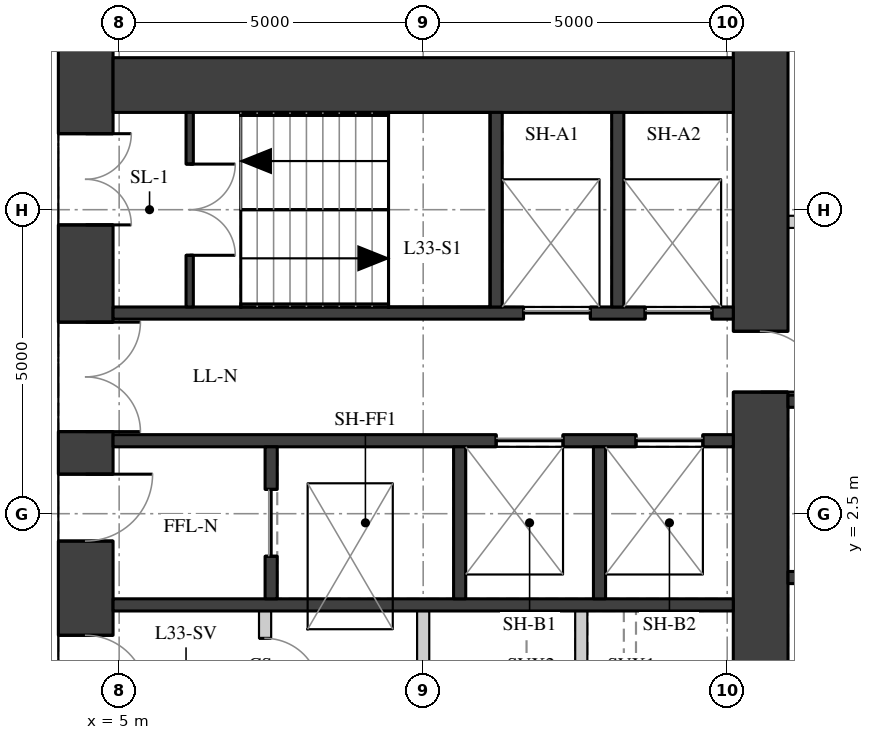
"""IFC4 building model, lengths in metres.
Left out: names, types, materials, properties, quantities, classifications, styles, units other than length and angle.
Written with IfcOpenShell. Run it as: python <this file> out.ifc"""

import sys

from ifc_helpers import new_model, si_unit, direction, frame, frame_2d, origin, place, context, subcontext, project, spatial, rectangle, extrude, element, fill, save


model = new_model("IFC4")
c1 = context("Model", 3, precision=1e-05, world=origin(), true_north=direction((0.0, 1.0)))
c2 = subcontext(c1, "Body", "Model", "MODEL_VIEW")
j1 = project(units=[si_unit("LENGTHUNIT", "METRE"), si_unit("PLANEANGLEUNIT", "RADIAN")], contexts=[c1])
p1 = place(None, origin())
s1 = spatial("IfcSite", under=j1, at=p1, CompositionType="ELEMENT")
p2 = place(p1, origin())
s2 = spatial("IfcBuilding", under=s1, at=p2, CompositionType="ELEMENT")
p3 = place(p2, frame((0.0, 0.0, 118.6)))
s3 = spatial("IfcBuildingStorey", under=s2, at=p3, CompositionType="ELEMENT", Elevation=118.6)
p4 = place(p3, frame((4.45, -11.1, 0.0), z_axis=(0.0, 0.0, 1.0), x_axis=(0.0, 1.0, 0.0)))
e1 = element("IfcWall", 1, at=p4, inside=s3, PredefinedType="SHEAR", context=c2, shape_type="SweptSolid", body=[
    extrude(rectangle(XDim=22.2, YDim=0.9, at=frame_2d((11.1, 0.0))), origin(), (0.0, 0.0, 1.0), 3.02),
])
p5 = place(p4, frame((2.35, 0.0, 0.0)))
e2 = element("IfcOpeningElement", 2, at=p5, cuts=e1, PredefinedType="OPENING", context=c2, shape_type="SweptSolid", body=[
    extrude(rectangle(XDim=1.5, YDim=2.1, at=frame_2d((0.75, 1.05))), frame((0.0, 0.46, 0.0), z_axis=(0.0, -1.0, 0.0), x_axis=(1.0, 0.0, 0.0)), (0.0, 0.0, 1.0), 0.92),
])
p6 = place(p4, frame((5.45, 0.0, 0.0)))
e3 = element("IfcOpeningElement", 3, at=p6, cuts=e1, PredefinedType="OPENING", context=c2, shape_type="SweptSolid", body=[
    extrude(rectangle(XDim=1.8, YDim=2.1, at=frame_2d((0.9, 1.05))), frame((0.0, 0.46, 0.0), z_axis=(0.0, -1.0, 0.0), x_axis=(1.0, 0.0, 0.0)), (0.0, 0.0, 1.0), 0.92),
])
p7 = place(p4, frame((7.95, 0.0, 0.0)))
e4 = element("IfcOpeningElement", 4, at=p7, cuts=e1, PredefinedType="OPENING", context=c2, shape_type="SweptSolid", body=[
    extrude(rectangle(XDim=1.1, YDim=2.1, at=frame_2d((0.55, 1.05))), frame((0.0, 0.46, 0.0), z_axis=(0.0, -1.0, 0.0), x_axis=(1.0, 0.0, 0.0)), (0.0, 0.0, 1.0), 0.92),
])
p8 = place(p4, frame((10.6, 0.0, 0.0)))
e5 = element("IfcOpeningElement", 5, at=p8, cuts=e1, PredefinedType="OPENING", context=c2, shape_type="SweptSolid", body=[
    extrude(rectangle(XDim=1.0, YDim=2.1, at=frame_2d((0.5, 1.05))), frame((0.0, 0.46, 0.0), z_axis=(0.0, -1.0, 0.0), x_axis=(1.0, 0.0, 0.0)), (0.0, 0.0, 1.0), 0.92),
])
p9 = place(p4, frame((13.15, 0.0, 0.0)))
e6 = element("IfcOpeningElement", 6, at=p9, cuts=e1, PredefinedType="OPENING", context=c2, shape_type="SweptSolid", body=[
    extrude(rectangle(XDim=1.1, YDim=2.1, at=frame_2d((0.55, 1.05))), frame((0.0, 0.46, 0.0), z_axis=(0.0, -1.0, 0.0), x_axis=(1.0, 0.0, 0.0)), (0.0, 0.0, 1.0), 0.92),
])
p10 = place(p4, frame((14.95, 0.0, 0.0)))
e7 = element("IfcOpeningElement", 7, at=p10, cuts=e1, PredefinedType="OPENING", context=c2, shape_type="SweptSolid", body=[
    extrude(rectangle(XDim=1.8, YDim=2.1, at=frame_2d((0.9, 1.05))), frame((0.0, 0.46, 0.0), z_axis=(0.0, -1.0, 0.0), x_axis=(1.0, 0.0, 0.0)), (0.0, 0.0, 1.0), 0.92),
])
p11 = place(p4, frame((18.35, 0.0, 0.0)))
e8 = element("IfcOpeningElement", 8, at=p11, cuts=e1, PredefinedType="OPENING", context=c2, shape_type="SweptSolid", body=[
    extrude(rectangle(XDim=1.5, YDim=2.1, at=frame_2d((0.75, 1.05))), frame((0.0, 0.46, 0.0), z_axis=(0.0, -1.0, 0.0), x_axis=(1.0, 0.0, 0.0)), (0.0, 0.0, 1.0), 0.92),
])
p12 = place(p3, frame((15.55, -11.1, 0.0), z_axis=(0.0, 0.0, 1.0), x_axis=(0.0, 1.0, 0.0)))
e9 = element("IfcWall", 9, at=p12, inside=s3, PredefinedType="SHEAR", context=c2, shape_type="SweptSolid", body=[
    extrude(rectangle(XDim=22.2, YDim=0.9, at=frame_2d((11.1, 0.0))), origin(), (0.0, 0.0, 1.0), 3.02),
])
p13 = place(p12, frame((15.6, 0.0, 0.0)))
e10 = element("IfcOpeningElement", 10, at=p13, cuts=e9, PredefinedType="OPENING", context=c2, shape_type="SweptSolid", body=[
    extrude(rectangle(XDim=1.0, YDim=2.1, at=frame_2d((0.5, 1.05))), frame((0.0, 0.46, 0.0), z_axis=(0.0, -1.0, 0.0), x_axis=(1.0, 0.0, 0.0)), (0.0, 0.0, 1.0), 0.92),
])
p14 = place(p12, frame((5.6, 0.0, 0.0)))
e11 = element("IfcOpeningElement", 11, at=p14, cuts=e9, PredefinedType="OPENING", context=c2, shape_type="SweptSolid", body=[
    extrude(rectangle(XDim=1.0, YDim=2.1, at=frame_2d((0.5, 1.05))), frame((0.0, 0.46, 0.0), z_axis=(0.0, -1.0, 0.0), x_axis=(1.0, 0.0, 0.0)), (0.0, 0.0, 1.0), 0.92),
])
p15 = place(p3, frame((4.9, 9.55, 0.0), z_axis=(0.0, 0.0, 1.0), x_axis=(1.0, 0.0, 0.0)))
e12 = element("IfcWall", 12, at=p15, inside=s3, PredefinedType="SHEAR", context=c2, shape_type="SweptSolid", body=[
    extrude(rectangle(XDim=10.2, YDim=0.9, at=frame_2d((5.1, 0.0))), origin(), (0.0, 0.0, 1.0), 3.02),
])
p16 = place(p3, frame((4.9, 5.8, 0.0), z_axis=(0.0, 0.0, 1.0), x_axis=(1.0, 0.0, 0.0)))
e13 = element("IfcWall", 13, at=p16, inside=s3, PredefinedType="SHEAR", context=c2, shape_type="SweptSolid", body=[
    extrude(rectangle(XDim=10.2, YDim=0.2, at=frame_2d((5.1, 0.0))), origin(), (0.0, 0.0, 1.0), 3.02),
])
p17 = place(p16, frame((6.75, 0.0, 0.0)))
e14 = element("IfcOpeningElement", 14, at=p17, cuts=e13, PredefinedType="OPENING", context=c2, shape_type="SweptSolid", body=[
    extrude(rectangle(XDim=1.1, YDim=2.1, at=frame_2d((0.55, 1.05))), frame((0.0, 0.11, 0.0), z_axis=(0.0, -1.0, 0.0), x_axis=(1.0, 0.0, 0.0)), (0.0, 0.0, 1.0), 0.22),
])
p18 = place(p16, frame((8.75, 0.0, 0.0)))
e15 = element("IfcOpeningElement", 15, at=p18, cuts=e13, PredefinedType="OPENING", context=c2, shape_type="SweptSolid", body=[
    extrude(rectangle(XDim=1.1, YDim=2.1, at=frame_2d((0.55, 1.05))), frame((0.0, 0.11, 0.0), z_axis=(0.0, -1.0, 0.0), x_axis=(1.0, 0.0, 0.0)), (0.0, 0.0, 1.0), 0.22),
])
p19 = place(p3, frame((4.9, 3.7, 0.0), z_axis=(0.0, 0.0, 1.0), x_axis=(1.0, 0.0, 0.0)))
e16 = element("IfcWall", 16, at=p19, inside=s3, PredefinedType="SHEAR", context=c2, shape_type="SweptSolid", body=[
    extrude(rectangle(XDim=10.2, YDim=0.2, at=frame_2d((5.1, 0.0))), origin(), (0.0, 0.0, 1.0), 3.02),
])
p20 = place(p19, frame((6.3, 0.0, 0.0)))
e17 = element("IfcOpeningElement", 17, at=p20, cuts=e16, PredefinedType="OPENING", context=c2, shape_type="SweptSolid", body=[
    extrude(rectangle(XDim=1.1, YDim=2.1, at=frame_2d((0.55, 1.05))), frame((0.0, 0.11, 0.0), z_axis=(0.0, -1.0, 0.0), x_axis=(1.0, 0.0, 0.0)), (0.0, 0.0, 1.0), 0.22),
])
p21 = place(p19, frame((8.6, 0.0, 0.0)))
e18 = element("IfcOpeningElement", 18, at=p21, cuts=e16, PredefinedType="OPENING", context=c2, shape_type="SweptSolid", body=[
    extrude(rectangle(XDim=1.1, YDim=2.1, at=frame_2d((0.55, 1.05))), frame((0.0, 0.11, 0.0), z_axis=(0.0, -1.0, 0.0), x_axis=(1.0, 0.0, 0.0)), (0.0, 0.0, 1.0), 0.22),
])
p22 = place(p3, frame((4.9, 1.0, 0.0), z_axis=(0.0, 0.0, 1.0), x_axis=(1.0, 0.0, 0.0)))
e19 = element("IfcWall", 19, at=p22, inside=s3, PredefinedType="SHEAR", context=c2, shape_type="SweptSolid", body=[
    extrude(rectangle(XDim=10.2, YDim=0.2, at=frame_2d((5.1, 0.0))), origin(), (0.0, 0.0, 1.0), 3.02),
])
for number, where, z_axis, x_axis in (
    (20, (11.2, 5.9, 0.0), (0.0, 0.0, 1.0), (0.0, 1.0, 0.0)),
    (21, (13.2, 5.9, 0.0), (0.0, 0.0, 1.0), (0.0, 1.0, 0.0)),
):
    element("IfcWall", number, at=place(p3, frame(where, z_axis=z_axis, x_axis=x_axis)), inside=s3, PredefinedType="SHEAR", context=c2, shape_type="SweptSolid", body=[
        extrude(rectangle(XDim=3.2, YDim=0.2, at=frame_2d((1.6, 0.0))), origin(), (0.0, 0.0, 1.0), 3.02),
    ])
p23 = place(p3, frame((7.5, 1.1, 0.0), z_axis=(0.0, 0.0, 1.0), x_axis=(0.0, 1.0, 0.0)))
e22 = element("IfcWall", 22, at=p23, inside=s3, PredefinedType="SHEAR", context=c2, shape_type="SweptSolid", body=[
    extrude(rectangle(XDim=2.5, YDim=0.2, at=frame_2d((1.25, 0.0))), origin(), (0.0, 0.0, 1.0), 3.02),
])
p24 = place(p23, frame((0.7, 0.0, 0.0)))
e23 = element("IfcOpeningElement", 23, at=p24, cuts=e22, PredefinedType="OPENING", context=c2, shape_type="SweptSolid", body=[
    extrude(rectangle(XDim=1.1, YDim=2.1, at=frame_2d((0.55, 1.05))), frame((0.0, 0.11, 0.0), z_axis=(0.0, -1.0, 0.0), x_axis=(1.0, 0.0, 0.0)), (0.0, 0.0, 1.0), 0.22),
])
for number, where, z_axis, x_axis in (
    (24, (10.6, 1.1, 0.0), (0.0, 0.0, 1.0), (0.0, 1.0, 0.0)),
    (25, (12.9, 1.1, 0.0), (0.0, 0.0, 1.0), (0.0, 1.0, 0.0)),
):
    element("IfcWall", number, at=place(p3, frame(where, z_axis=z_axis, x_axis=x_axis)), inside=s3, PredefinedType="SHEAR", context=c2, shape_type="SweptSolid", body=[
        extrude(rectangle(XDim=2.5, YDim=0.2, at=frame_2d((1.25, 0.0))), origin(), (0.0, 0.0, 1.0), 3.02),
    ])
p25 = place(p3, frame((6.16, 5.9, 0.0), z_axis=(0.0, 0.0, 1.0), x_axis=(0.0, 1.0, 0.0)))
e26 = element("IfcWall", 26, at=p25, inside=s3, PredefinedType="SHEAR", context=c2, shape_type="SweptSolid", body=[
    extrude(rectangle(XDim=3.2, YDim=0.12, at=frame_2d((1.6, 0.0))), origin(), (0.0, 0.0, 1.0), 3.02),
])
p26 = place(p25, frame((0.85, 0.0, 0.0)))
e27 = element("IfcOpeningElement", 27, at=p26, cuts=e26, PredefinedType="OPENING", context=c2, shape_type="SweptSolid", body=[
    extrude(rectangle(XDim=1.5, YDim=2.1, at=frame_2d((0.75, 1.05))), frame((0.0, 0.07, 0.0), z_axis=(0.0, -1.0, 0.0), x_axis=(1.0, 0.0, 0.0)), (0.0, 0.0, 1.0), 0.14),
])
p27 = place(p3, frame((7.4, -0.9, 0.0), z_axis=(0.0, 0.0, 1.0), x_axis=(0.0, 1.0, 0.0)))
e28 = element("IfcWall", 28, at=p27, inside=s3, PredefinedType="PARTITIONING", context=c2, shape_type="SweptSolid", body=[
    extrude(rectangle(XDim=1.8, YDim=0.2, at=frame_2d((0.9, 0.0))), origin(), (0.0, 0.0, 1.0), 3.02),
])
p28 = place(p27, frame((0.45, 0.0, 0.0)))
e29 = element("IfcOpeningElement", 29, at=p28, cuts=e28, PredefinedType="OPENING", context=c2, shape_type="SweptSolid", body=[
    extrude(rectangle(XDim=0.9, YDim=2.1, at=frame_2d((0.45, 1.05))), frame((0.0, 0.11, 0.0), z_axis=(0.0, -1.0, 0.0), x_axis=(1.0, 0.0, 0.0)), (0.0, 0.0, 1.0), 0.22),
])
for number, where, z_axis, x_axis in (
    (30, (10.0, -0.9, 0.0), (0.0, 0.0, 1.0), (0.0, 1.0, 0.0)),
    (31, (12.6, -0.9, 0.0), (0.0, 0.0, 1.0), (0.0, 1.0, 0.0)),
):
    element("IfcWall", number, at=place(p3, frame(where, z_axis=z_axis, x_axis=x_axis)), inside=s3, PredefinedType="PARTITIONING", context=c2, shape_type="SweptSolid", body=[
        extrude(rectangle(XDim=1.8, YDim=0.2, at=frame_2d((0.9, 0.0))), origin(), (0.0, 0.0, 1.0), 3.02),
    ])
for number, where, z_axis, x_axis in (
    (32, (16.0, 1.45, 0.0), (0.0, 0.0, 1.0), (1.0, 0.0, 0.0)),
    (33, (16.0, 4.35, 0.0), (0.0, 0.0, 1.0), (1.0, 0.0, 0.0)),
):
    element("IfcWall", number, at=place(p3, frame(where, z_axis=z_axis, x_axis=x_axis)), inside=s3, PredefinedType="SHEAR", context=c2, shape_type="SweptSolid", body=[
        extrude(rectangle(XDim=2.3, YDim=0.2, at=frame_2d((1.15, 0.0))), origin(), (0.0, 0.0, 1.0), 3.02),
    ])
p29 = place(p3, frame((16.0, 7.3, 0.0), z_axis=(0.0, 0.0, 1.0), x_axis=(1.0, 0.0, 0.0)))
e34 = element("IfcWall", 34, at=p29, inside=s3, PredefinedType="PARTITIONING", context=c2, shape_type="SweptSolid", body=[
    extrude(rectangle(XDim=2.3, YDim=0.2, at=frame_2d((1.15, 0.0))), origin(), (0.0, 0.0, 1.0), 3.02),
])
p30 = place(p29, frame((0.2, 0.0, 0.0)))
e35 = element("IfcOpeningElement", 35, at=p30, cuts=e34, PredefinedType="OPENING", context=c2, shape_type="SweptSolid", body=[
    extrude(rectangle(XDim=0.9, YDim=2.1, at=frame_2d((0.45, 1.05))), frame((0.0, 0.11, 0.0), z_axis=(0.0, -1.0, 0.0), x_axis=(1.0, 0.0, 0.0)), (0.0, 0.0, 1.0), 0.22),
])
p31 = place(p8, origin())
e36 = element("IfcDoor", 36, at=p31, inside=s3, OperationType="SINGLE_SWING_RIGHT", PredefinedType="DOOR", context=c2, shape_type="SweptSolid", body=[
    extrude(rectangle(XDim=1.0, YDim=2.1, at=frame_2d((0.5, 1.05))), frame((0.0, 0.025, 0.0), z_axis=(0.0, -1.0, 0.0), x_axis=(1.0, 0.0, 0.0)), (0.0, 0.0, 1.0), 0.05),
])
fill(e5, e36)
p32 = place(p9, origin())
e37 = element("IfcDoor", 37, at=p32, inside=s3, OperationType="SINGLE_SWING_LEFT", PredefinedType="DOOR", context=c2, shape_type="SweptSolid", body=[
    extrude(rectangle(XDim=1.1, YDim=2.1, at=frame_2d((0.55, 1.05))), frame((0.0, 0.025, 0.0), z_axis=(0.0, -1.0, 0.0), x_axis=(1.0, 0.0, 0.0)), (0.0, 0.0, 1.0), 0.05),
])
fill(e6, e37)
p33 = place(p10, origin())
e38 = element("IfcDoor", 38, at=p33, inside=s3, OperationType="DOUBLE_DOOR_SINGLE_SWING", PredefinedType="DOOR", context=c2, shape_type="SweptSolid", body=[
    extrude(rectangle(XDim=1.8, YDim=2.1, at=frame_2d((0.9, 1.05))), frame((0.0, 0.025, 0.0), z_axis=(0.0, -1.0, 0.0), x_axis=(1.0, 0.0, 0.0)), (0.0, 0.0, 1.0), 0.05),
])
fill(e7, e38)
p34 = place(p11, origin())
e39 = element("IfcDoor", 39, at=p34, inside=s3, OperationType="DOUBLE_DOOR_SINGLE_SWING", PredefinedType="DOOR", context=c2, shape_type="SweptSolid", body=[
    extrude(rectangle(XDim=1.5, YDim=2.1, at=frame_2d((0.75, 1.05))), frame((0.0, 0.025, 0.0), z_axis=(0.0, -1.0, 0.0), x_axis=(1.0, 0.0, 0.0)), (0.0, 0.0, 1.0), 0.05),
])
fill(e8, e39)
p35 = place(p26, origin())
e40 = element("IfcDoor", 40, at=p35, inside=s3, OperationType="DOUBLE_DOOR_SINGLE_SWING", PredefinedType="DOOR", context=c2, shape_type="SweptSolid", body=[
    extrude(rectangle(XDim=1.5, YDim=2.1, at=frame_2d((0.75, 1.05))), frame((0.0, 0.025, 0.0), z_axis=(0.0, -1.0, 0.0), x_axis=(1.0, 0.0, 0.0)), (0.0, 0.0, 1.0), 0.05),
])
fill(e27, e40)
p36 = place(p17, origin())
e41 = element("IfcDoor", 41, at=p36, inside=s3, OperationType="DOUBLE_DOOR_SLIDING", PredefinedType="DOOR", context=c2, shape_type="SweptSolid", body=[
    extrude(rectangle(XDim=1.1, YDim=2.1, at=frame_2d((0.55, 1.05))), frame((0.0, 0.025, 0.0), z_axis=(0.0, -1.0, 0.0), x_axis=(1.0, 0.0, 0.0)), (0.0, 0.0, 1.0), 0.05),
])
fill(e14, e41)
p37 = place(p18, origin())
e42 = element("IfcDoor", 42, at=p37, inside=s3, OperationType="DOUBLE_DOOR_SLIDING", PredefinedType="DOOR", context=c2, shape_type="SweptSolid", body=[
    extrude(rectangle(XDim=1.1, YDim=2.1, at=frame_2d((0.55, 1.05))), frame((0.0, 0.025, 0.0), z_axis=(0.0, -1.0, 0.0), x_axis=(1.0, 0.0, 0.0)), (0.0, 0.0, 1.0), 0.05),
])
fill(e15, e42)
p38 = place(p20, origin())
e43 = element("IfcDoor", 43, at=p38, inside=s3, OperationType="DOUBLE_DOOR_SLIDING", PredefinedType="DOOR", context=c2, shape_type="SweptSolid", body=[
    extrude(rectangle(XDim=1.1, YDim=2.1, at=frame_2d((0.55, 1.05))), frame((0.0, 0.025, 0.0), z_axis=(0.0, -1.0, 0.0), x_axis=(1.0, 0.0, 0.0)), (0.0, 0.0, 1.0), 0.05),
])
fill(e17, e43)
p39 = place(p21, origin())
e44 = element("IfcDoor", 44, at=p39, inside=s3, OperationType="DOUBLE_DOOR_SLIDING", PredefinedType="DOOR", context=c2, shape_type="SweptSolid", body=[
    extrude(rectangle(XDim=1.1, YDim=2.1, at=frame_2d((0.55, 1.05))), frame((0.0, 0.025, 0.0), z_axis=(0.0, -1.0, 0.0), x_axis=(1.0, 0.0, 0.0)), (0.0, 0.0, 1.0), 0.05),
])
fill(e18, e44)
p40 = place(p24, origin())
e45 = element("IfcDoor", 45, at=p40, inside=s3, OperationType="DOUBLE_DOOR_SLIDING", PredefinedType="DOOR", context=c2, shape_type="SweptSolid", body=[
    extrude(rectangle(XDim=1.1, YDim=2.1, at=frame_2d((0.55, 1.05))), frame((0.0, 0.025, 0.0), z_axis=(0.0, -1.0, 0.0), x_axis=(1.0, 0.0, 0.0)), (0.0, 0.0, 1.0), 0.05),
])
fill(e23, e45)
p41 = place(p28, origin())
e46 = element("IfcDoor", 46, at=p41, inside=s3, OperationType="SINGLE_SWING_RIGHT", PredefinedType="DOOR", context=c2, shape_type="SweptSolid", body=[
    extrude(rectangle(XDim=0.9, YDim=2.1, at=frame_2d((0.45, 1.05))), frame((0.0, 0.025, 0.0), z_axis=(0.0, -1.0, 0.0), x_axis=(1.0, 0.0, 0.0)), (0.0, 0.0, 1.0), 0.05),
])
fill(e29, e46)
p42 = place(p13, origin())
e47 = element("IfcDoor", 47, at=p42, inside=s3, OperationType="SINGLE_SWING_RIGHT", PredefinedType="DOOR", context=c2, shape_type="SweptSolid", body=[
    extrude(rectangle(XDim=1.0, YDim=2.1, at=frame_2d((0.5, 1.05))), frame((0.0, 0.025, 0.0), z_axis=(0.0, -1.0, 0.0), x_axis=(1.0, 0.0, 0.0)), (0.0, 0.0, 1.0), 0.05),
])
fill(e10, e47)
save(model, sys.argv[1])
